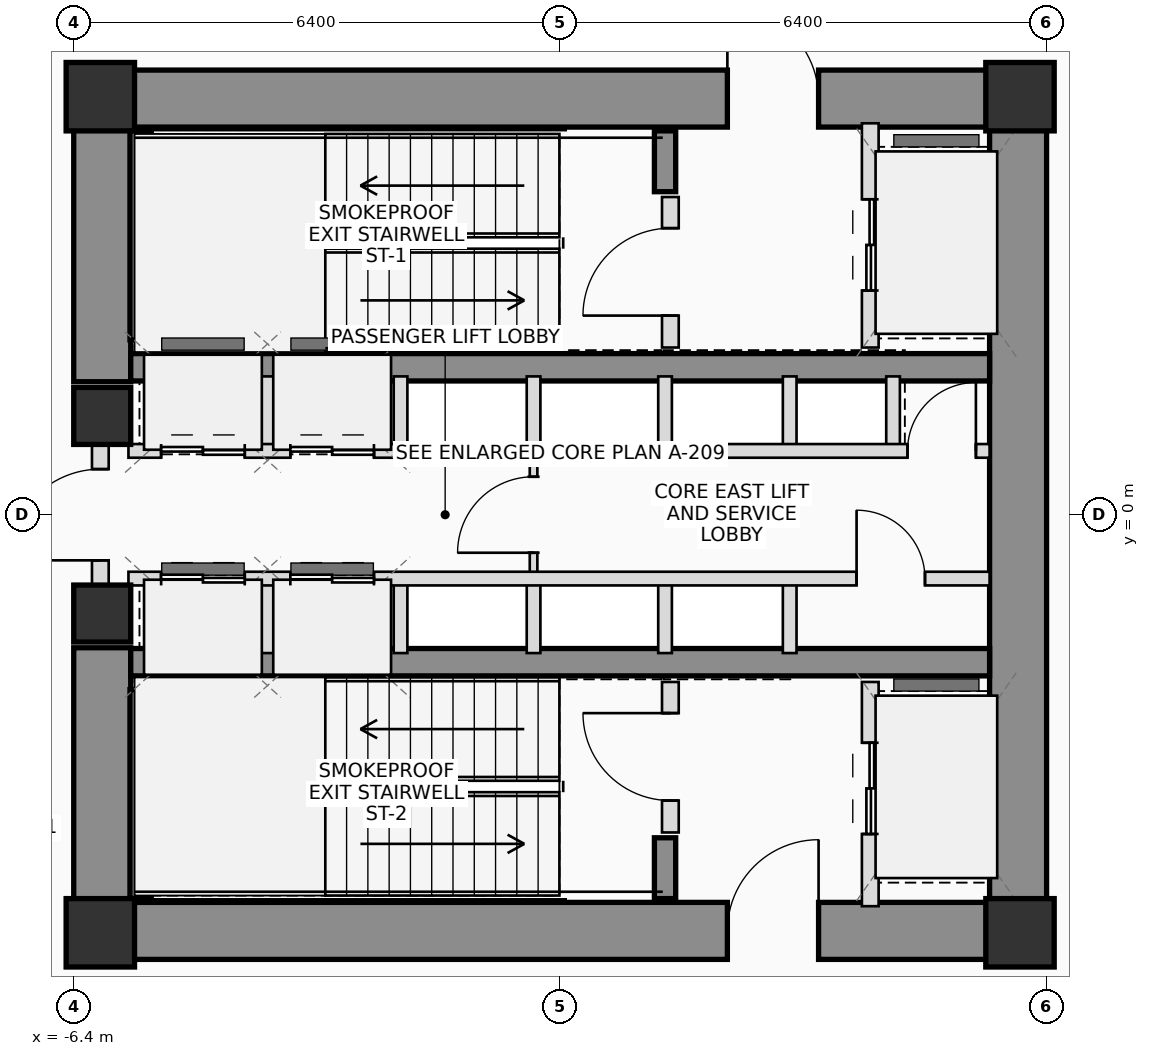
"""IFC4 building model, lengths in metres.
Left out: names, types, materials, properties, quantities, classifications, styles, units other than length and angle.
Written with IfcOpenShell. Run it as: python <this file> out.ifc"""

import sys

from ifc_helpers import new_model, si_unit, direction, frame, frame_2d, origin, origin_2d, place, context, subcontext, project, spatial, rectangle, extrude, source, transform, mapped, element, fill, save


model = new_model("IFC4")
c1 = context("Model", 3, precision=1e-05, world=origin(), true_north=direction((0.0, 1.0)))
c2 = subcontext(c1, "Body", "Model", "MODEL_VIEW")
j1 = project(units=[si_unit("LENGTHUNIT", "METRE"), si_unit("PLANEANGLEUNIT", "RADIAN")], contexts=[c1])
p1 = place(None, origin())
s1 = spatial("IfcSite", under=j1, at=p1, CompositionType="ELEMENT")
p2 = place(p1, origin())
s2 = spatial("IfcBuilding", under=s1, at=p2, CompositionType="ELEMENT")
p3 = place(p2, frame((0.0, 0.0, 108.65)))
s3 = spatial("IfcBuildingStorey", under=s2, at=p3, CompositionType="ELEMENT", Elevation=108.65)
m1 = source(origin(), c2, "Body", "SweptSolid", [
    extrude(rectangle(XDim=0.9, YDim=0.9, at=origin_2d()), origin(), (0.0, 0.0, 1.0), 3.75),
])
for number, where, z_axis, x_axis in (
    (1, (-6.05, -5.5, 0.0), (0.0, 0.0, 1.0), (1.0, 0.0, 0.0)),
    (2, (6.05, -5.5, 0.0), (0.0, 0.0, 1.0), (1.0, 0.0, 0.0)),
    (3, (6.05, 5.5, 0.0), (0.0, 0.0, 1.0), (1.0, 0.0, 0.0)),
    (4, (-6.05, 5.5, 0.0), (0.0, 0.0, 1.0), (1.0, 0.0, 0.0)),
):
    element("IfcColumn", number, at=place(p3, frame(where, z_axis=z_axis, x_axis=x_axis)), inside=s3, PredefinedType="COLUMN", context=c2, shape_type="MappedRepresentation", body=[
        mapped(m1, transform((0.0, 0.0, 0.0), scale=1.0)),
    ])
p4 = place(p3, frame((-6.4, 5.475, 0.0), z_axis=(0.0, 0.0, 1.0), x_axis=(1.0, 0.0, 0.0)))
e5 = element("IfcWall", 5, at=p4, inside=s3, PredefinedType="SHEAR", context=c2, shape_type="SweptSolid", body=[
    extrude(rectangle(XDim=12.8, YDim=0.75, at=frame_2d((6.4, 0.0))), origin(), (0.0, 0.0, 1.0), 3.75),
])
p5 = place(p4, frame((8.6, 0.0, 0.0)))
e6 = element("IfcOpeningElement", 6, at=p5, cuts=e5, PredefinedType="OPENING", context=c2, shape_type="SweptSolid", body=[
    extrude(rectangle(XDim=1.2, YDim=2.2, at=frame_2d((0.6, 1.1))), frame((0.0, 0.385, 0.0), z_axis=(0.0, -1.0, 0.0), x_axis=(1.0, 0.0, 0.0)), (0.0, 0.0, 1.0), 0.77),
])
p6 = place(p3, frame((-6.4, -5.475, 0.0), z_axis=(0.0, 0.0, 1.0), x_axis=(1.0, 0.0, 0.0)))
e7 = element("IfcWall", 7, at=p6, inside=s3, PredefinedType="SHEAR", context=c2, shape_type="SweptSolid", body=[
    extrude(rectangle(XDim=12.8, YDim=0.75, at=frame_2d((6.4, 0.0))), origin(), (0.0, 0.0, 1.0), 3.75),
])
p7 = place(p6, frame((8.6, 0.0, 0.0)))
e8 = element("IfcOpeningElement", 8, at=p7, cuts=e7, PredefinedType="OPENING", context=c2, shape_type="SweptSolid", body=[
    extrude(rectangle(XDim=1.2, YDim=2.2, at=frame_2d((0.6, 1.1))), frame((0.0, 0.385, 0.0), z_axis=(0.0, -1.0, 0.0), x_axis=(1.0, 0.0, 0.0)), (0.0, 0.0, 1.0), 0.77),
])
p8 = place(p3, frame((6.025, -5.1, 0.0), z_axis=(0.0, 0.0, 1.0), x_axis=(0.0, 1.0, 0.0)))
e9 = element("IfcWall", 9, at=p8, inside=s3, PredefinedType="SHEAR", context=c2, shape_type="SweptSolid", body=[
    extrude(rectangle(XDim=10.2, YDim=0.75, at=frame_2d((5.1, 0.0))), origin(), (0.0, 0.0, 1.0), 3.75),
])
for number, where, z_axis, x_axis in (
    (10, (-6.025, -5.1, 0.0), (0.0, 0.0, 1.0), (0.0, 1.0, 0.0)),
    (11, (-6.025, 1.75, 0.0), (0.0, 0.0, 1.0), (0.0, 1.0, 0.0)),
):
    element("IfcWall", number, at=place(p3, frame(where, z_axis=z_axis, x_axis=x_axis)), inside=s3, PredefinedType="SHEAR", context=c2, shape_type="SweptSolid", body=[
        extrude(rectangle(XDim=3.35, YDim=0.75, at=frame_2d((1.675, 0.0))), origin(), (0.0, 0.0, 1.0), 3.75),
    ])
for number, where, z_axis, x_axis in (
    (12, (-5.65, 1.94, 0.0), (0.0, 0.0, 1.0), (1.0, 0.0, 0.0)),
    (13, (-5.65, -1.94, 0.0), (0.0, 0.0, 1.0), (1.0, 0.0, 0.0)),
):
    element("IfcWall", number, at=place(p3, frame(where, z_axis=z_axis, x_axis=x_axis)), inside=s3, PredefinedType="SHEAR", context=c2, shape_type="SweptSolid", body=[
        extrude(rectangle(XDim=11.3, YDim=0.36, at=frame_2d((5.65, 0.0))), origin(), (0.0, 0.0, 1.0), 3.75),
    ])
p9 = place(p3, frame((-5.52, 2.3, 0.0), z_axis=(0.0, 0.0, 1.0), x_axis=(0.0, 1.0, 0.0)))
e14 = element("IfcWall", 14, at=p9, inside=s3, PredefinedType="SHEAR", context=c2, shape_type="SweptSolid", body=[
    extrude(rectangle(XDim=2.75, YDim=0.28, at=frame_2d((1.375, 0.0))), origin(), (0.0, 0.0, 1.0), 3.75),
])
p10 = place(p3, frame((1.38, 4.25, 0.0), z_axis=(0.0, 0.0, 1.0), x_axis=(0.0, 1.0, 0.0)))
e15 = element("IfcWall", 15, at=p10, inside=s3, PredefinedType="SHEAR", context=c2, shape_type="SweptSolid", body=[
    extrude(rectangle(XDim=0.8, YDim=0.28, at=frame_2d((0.4, 0.0))), origin(), (0.0, 0.0, 1.0), 3.75),
])
p11 = place(p3, frame((-5.52, -5.05, 0.0), z_axis=(0.0, 0.0, 1.0), x_axis=(0.0, 1.0, 0.0)))
e16 = element("IfcWall", 16, at=p11, inside=s3, PredefinedType="SHEAR", context=c2, shape_type="SweptSolid", body=[
    extrude(rectangle(XDim=2.75, YDim=0.28, at=frame_2d((1.375, 0.0))), origin(), (0.0, 0.0, 1.0), 3.75),
])
p12 = place(p3, frame((1.38, -5.05, 0.0), z_axis=(0.0, 0.0, 1.0), x_axis=(0.0, 1.0, 0.0)))
e17 = element("IfcWall", 17, at=p12, inside=s3, PredefinedType="SHEAR", context=c2, shape_type="SweptSolid", body=[
    extrude(rectangle(XDim=0.8, YDim=0.28, at=frame_2d((0.4, 0.0))), origin(), (0.0, 0.0, 1.0), 3.75),
])
m2 = source(origin(), c2, "Body", "SweptSolid", [
    extrude(rectangle(XDim=0.75, YDim=0.75, at=origin_2d()), origin(), (0.0, 0.0, 1.0), 3.75),
])
for number, where, z_axis, x_axis in (
    (18, (-6.025, -1.3, 0.0), (0.0, 0.0, 1.0), (1.0, 0.0, 0.0)),
    (19, (-6.025, 1.3, 0.0), (0.0, 0.0, 1.0), (1.0, 0.0, 0.0)),
):
    element("IfcColumn", number, at=place(p3, frame(where, z_axis=z_axis, x_axis=x_axis)), inside=s3, PredefinedType="COLUMN", context=c2, shape_type="MappedRepresentation", body=[
        mapped(m2, transform((0.0, 0.0, 0.0), scale=1.0)),
    ])
p13 = place(p3, frame((-6.05, -0.95, 0.0), z_axis=(0.0, 0.0, 1.0), x_axis=(0.0, 1.0, 0.0)))
e20 = element("IfcWall", 20, at=p13, inside=s3, PredefinedType="PLUMBINGWALL", context=c2, shape_type="SweptSolid", body=[
    extrude(rectangle(XDim=1.9, YDim=0.22, at=frame_2d((0.95, 0.0))), origin(), (0.0, 0.0, 1.0), 2.525),
])
p14 = place(p13, frame((0.35, 0.0, 0.0)))
e21 = element("IfcOpeningElement", 21, at=p14, cuts=e20, PredefinedType="OPENING", context=c2, shape_type="SweptSolid", body=[
    extrude(rectangle(XDim=1.2, YDim=2.2, at=frame_2d((0.6, 1.1))), frame((0.0, 0.12, 0.0), z_axis=(0.0, -1.0, 0.0), x_axis=(1.0, 0.0, 0.0)), (0.0, 0.0, 1.0), 0.24),
])
p15 = place(p3, frame((1.45, 2.2, 0.0), z_axis=(0.0, 0.0, 1.0), x_axis=(0.0, 1.0, 0.0)))
e22 = element("IfcWall", 22, at=p15, inside=s3, PredefinedType="PLUMBINGWALL", context=c2, shape_type="SweptSolid", body=[
    extrude(rectangle(XDim=1.98, YDim=0.22, at=frame_2d((0.99, 0.0))), origin(), (0.0, 0.0, 1.0), 3.545),
])
p16 = place(p15, frame((0.42, 0.0, 0.0)))
e23 = element("IfcOpeningElement", 23, at=p16, cuts=e22, PredefinedType="OPENING", context=c2, shape_type="SweptSolid", body=[
    extrude(rectangle(XDim=1.15, YDim=2.15, at=frame_2d((0.575, 1.075))), frame((0.0, 0.12, 0.0), z_axis=(0.0, -1.0, 0.0), x_axis=(1.0, 0.0, 0.0)), (0.0, 0.0, 1.0), 0.24),
])
p17 = place(p3, frame((4.08, 2.2, 0.0), z_axis=(0.0, 0.0, 1.0), x_axis=(0.0, 1.0, 0.0)))
e24 = element("IfcWall", 24, at=p17, inside=s3, PredefinedType="PLUMBINGWALL", context=c2, shape_type="SweptSolid", body=[
    extrude(rectangle(XDim=2.95, YDim=0.22, at=frame_2d((1.475, 0.0))), origin(), (0.0, 0.0, 1.0), 3.545),
])
p18 = place(p17, frame((0.75, 0.0, 0.0)))
e25 = element("IfcOpeningElement", 25, at=p18, cuts=e24, PredefinedType="OPENING", context=c2, shape_type="SweptSolid", body=[
    extrude(rectangle(XDim=1.2, YDim=2.25, at=frame_2d((0.6, 1.125))), frame((0.0, 0.12, 0.0), z_axis=(0.0, -1.0, 0.0), x_axis=(1.0, 0.0, 0.0)), (0.0, 0.0, 1.0), 0.24),
])
p19 = place(p3, frame((1.45, -4.18, 0.0), z_axis=(0.0, 0.0, 1.0), x_axis=(0.0, 1.0, 0.0)))
e26 = element("IfcWall", 26, at=p19, inside=s3, PredefinedType="PLUMBINGWALL", context=c2, shape_type="SweptSolid", body=[
    extrude(rectangle(XDim=1.98, YDim=0.22, at=frame_2d((0.99, 0.0))), origin(), (0.0, 0.0, 1.0), 3.545),
])
p20 = place(p19, frame((0.42, 0.0, 0.0)))
e27 = element("IfcOpeningElement", 27, at=p20, cuts=e26, PredefinedType="OPENING", context=c2, shape_type="SweptSolid", body=[
    extrude(rectangle(XDim=1.15, YDim=2.15, at=frame_2d((0.575, 1.075))), frame((0.0, 0.12, 0.0), z_axis=(0.0, -1.0, 0.0), x_axis=(1.0, 0.0, 0.0)), (0.0, 0.0, 1.0), 0.24),
])
p21 = place(p3, frame((4.08, -5.15, 0.0), z_axis=(0.0, 0.0, 1.0), x_axis=(0.0, 1.0, 0.0)))
e28 = element("IfcWall", 28, at=p21, inside=s3, PredefinedType="PLUMBINGWALL", context=c2, shape_type="SweptSolid", body=[
    extrude(rectangle(XDim=2.95, YDim=0.22, at=frame_2d((1.475, 0.0))), origin(), (0.0, 0.0, 1.0), 3.545),
])
p22 = place(p21, frame((0.95, 0.0, 0.0)))
e29 = element("IfcOpeningElement", 29, at=p22, cuts=e28, PredefinedType="OPENING", context=c2, shape_type="SweptSolid", body=[
    extrude(rectangle(XDim=1.2, YDim=2.25, at=frame_2d((0.6, 1.125))), frame((0.0, 0.12, 0.0), z_axis=(0.0, -1.0, 0.0), x_axis=(1.0, 0.0, 0.0)), (0.0, 0.0, 1.0), 0.24),
])
p23 = place(p3, frame((-0.35, -0.84, 0.0), z_axis=(0.0, 0.0, 1.0), x_axis=(0.0, 1.0, 0.0)))
e30 = element("IfcWall", 30, at=p23, inside=s3, PredefinedType="PARTITIONING", context=c2, shape_type="SweptSolid", body=[
    extrude(rectangle(XDim=1.68, YDim=0.1, at=frame_2d((0.84, 0.0))), origin(), (0.0, 0.0, 1.0), 3.545),
])
p24 = place(p23, frame((0.34, 0.0, 0.0)))
e31 = element("IfcOpeningElement", 31, at=p24, cuts=e30, PredefinedType="OPENING", context=c2, shape_type="SweptSolid", body=[
    extrude(rectangle(XDim=1.0, YDim=2.25, at=frame_2d((0.5, 1.125))), frame((0.0, 0.06, 0.0), z_axis=(0.0, -1.0, 0.0), x_axis=(1.0, 0.0, 0.0)), (0.0, 0.0, 1.0), 0.12),
])
for number, where, z_axis, x_axis in (
    (32, (-3.85, 0.84, 0.0), (0.0, 0.0, 1.0), (0.0, 1.0, 0.0)),
    (33, (-3.85, -1.82, 0.0), (0.0, 0.0, 1.0), (0.0, 1.0, 0.0)),
    (34, (-2.1, 0.84, 0.0), (0.0, 0.0, 1.0), (0.0, 1.0, 0.0)),
    (35, (-2.1, -1.82, 0.0), (0.0, 0.0, 1.0), (0.0, 1.0, 0.0)),
    (36, (-0.35, 0.84, 0.0), (0.0, 0.0, 1.0), (0.0, 1.0, 0.0)),
    (37, (-0.35, -1.82, 0.0), (0.0, 0.0, 1.0), (0.0, 1.0, 0.0)),
    (38, (1.38, 0.84, 0.0), (0.0, 0.0, 1.0), (0.0, 1.0, 0.0)),
    (39, (1.38, -1.82, 0.0), (0.0, 0.0, 1.0), (0.0, 1.0, 0.0)),
    (40, (3.02, 0.84, 0.0), (0.0, 0.0, 1.0), (0.0, 1.0, 0.0)),
    (41, (4.38, 0.84, 0.0), (0.0, 0.0, 1.0), (0.0, 1.0, 0.0)),
    (42, (3.02, -1.82, 0.0), (0.0, 0.0, 1.0), (0.0, 1.0, 0.0)),
):
    element("IfcWall", number, at=place(p3, frame(where, z_axis=z_axis, x_axis=x_axis)), inside=s3, PredefinedType="PLUMBINGWALL", context=c2, shape_type="SweptSolid", body=[
        extrude(rectangle(XDim=0.98, YDim=0.18, at=frame_2d((0.49, 0.0))), origin(), (0.0, 0.0, 1.0), 3.545),
    ])
p25 = place(p3, frame((-5.68, 0.84, 0.0), z_axis=(0.0, 0.0, 1.0), x_axis=(1.0, 0.0, 0.0)))
e43 = element("IfcWall", 43, at=p25, inside=s3, PredefinedType="PLUMBINGWALL", context=c2, shape_type="SweptSolid", body=[
    extrude(rectangle(XDim=11.33, YDim=0.18, at=frame_2d((5.665, 0.0))), origin(), (0.0, 0.0, 1.0), 3.545),
])
p26 = place(p25, frame((0.43, 0.0, 0.0)))
e44 = element("IfcOpeningElement", 44, at=p26, cuts=e43, PredefinedType="OPENING", context=c2, shape_type="SweptSolid", body=[
    extrude(rectangle(XDim=1.1, YDim=2.2, at=frame_2d((0.55, 1.1))), frame((0.0, 0.1, 0.0), z_axis=(0.0, -1.0, 0.0), x_axis=(1.0, 0.0, 0.0)), (0.0, 0.0, 1.0), 0.2),
])
p27 = place(p25, frame((2.13, 0.0, 0.0)))
e45 = element("IfcOpeningElement", 45, at=p27, cuts=e43, PredefinedType="OPENING", context=c2, shape_type="SweptSolid", body=[
    extrude(rectangle(XDim=1.1, YDim=2.2, at=frame_2d((0.55, 1.1))), frame((0.0, 0.1, 0.0), z_axis=(0.0, -1.0, 0.0), x_axis=(1.0, 0.0, 0.0)), (0.0, 0.0, 1.0), 0.2),
])
p28 = place(p25, frame((10.25, 0.0, 0.0)))
e46 = element("IfcOpeningElement", 46, at=p28, cuts=e43, PredefinedType="OPENING", context=c2, shape_type="SweptSolid", body=[
    extrude(rectangle(XDim=0.9, YDim=2.05, at=frame_2d((0.45, 1.025))), frame((0.0, 0.1, 0.0), z_axis=(0.0, -1.0, 0.0), x_axis=(1.0, 0.0, 0.0)), (0.0, 0.0, 1.0), 0.2),
])
p29 = place(p3, frame((-5.68, -0.84, 0.0), z_axis=(0.0, 0.0, 1.0), x_axis=(1.0, 0.0, 0.0)))
e47 = element("IfcWall", 47, at=p29, inside=s3, PredefinedType="PLUMBINGWALL", context=c2, shape_type="SweptSolid", body=[
    extrude(rectangle(XDim=11.33, YDim=0.18, at=frame_2d((5.665, 0.0))), origin(), (0.0, 0.0, 1.0), 3.545),
])
p30 = place(p29, frame((0.43, 0.0, 0.0)))
e48 = element("IfcOpeningElement", 48, at=p30, cuts=e47, PredefinedType="OPENING", context=c2, shape_type="SweptSolid", body=[
    extrude(rectangle(XDim=1.1, YDim=2.2, at=frame_2d((0.55, 1.1))), frame((0.0, 0.1, 0.0), z_axis=(0.0, -1.0, 0.0), x_axis=(1.0, 0.0, 0.0)), (0.0, 0.0, 1.0), 0.2),
])
p31 = place(p29, frame((2.13, 0.0, 0.0)))
e49 = element("IfcOpeningElement", 49, at=p31, cuts=e47, PredefinedType="OPENING", context=c2, shape_type="SweptSolid", body=[
    extrude(rectangle(XDim=1.1, YDim=2.2, at=frame_2d((0.55, 1.1))), frame((0.0, 0.1, 0.0), z_axis=(0.0, -1.0, 0.0), x_axis=(1.0, 0.0, 0.0)), (0.0, 0.0, 1.0), 0.2),
])
p32 = place(p29, frame((9.58, 0.0, 0.0)))
e50 = element("IfcOpeningElement", 50, at=p32, cuts=e47, PredefinedType="OPENING", context=c2, shape_type="SweptSolid", body=[
    extrude(rectangle(XDim=0.9, YDim=2.05, at=frame_2d((0.45, 1.025))), frame((0.0, 0.1, 0.0), z_axis=(0.0, -1.0, 0.0), x_axis=(1.0, 0.0, 0.0)), (0.0, 0.0, 1.0), 0.2),
])
p33 = place(p5, origin())
e51 = element("IfcDoor", 51, at=p33, inside=s3, OperationType="SINGLE_SWING_LEFT", PredefinedType="DOOR", context=c2, shape_type="SweptSolid", body=[
    extrude(rectangle(XDim=1.2, YDim=2.2, at=frame_2d((0.6, 1.1))), frame((0.0, 0.025, 0.0), z_axis=(0.0, -1.0, 0.0), x_axis=(1.0, 0.0, 0.0)), (0.0, 0.0, 1.0), 0.05),
])
fill(e6, e51)
p34 = place(p7, origin())
e52 = element("IfcDoor", 52, at=p34, inside=s3, OperationType="SINGLE_SWING_RIGHT", PredefinedType="DOOR", context=c2, shape_type="SweptSolid", body=[
    extrude(rectangle(XDim=1.2, YDim=2.2, at=frame_2d((0.6, 1.1))), frame((0.0, 0.025, 0.0), z_axis=(0.0, -1.0, 0.0), x_axis=(1.0, 0.0, 0.0)), (0.0, 0.0, 1.0), 0.05),
])
fill(e8, e52)
p35 = place(p14, origin())
e53 = element("IfcDoor", 53, at=p35, inside=s3, OperationType="SINGLE_SWING_LEFT", PredefinedType="DOOR", context=c2, shape_type="SweptSolid", body=[
    extrude(rectangle(XDim=1.2, YDim=2.2, at=frame_2d((0.6, 1.1))), frame((0.0, 0.025, 0.0), z_axis=(0.0, -1.0, 0.0), x_axis=(1.0, 0.0, 0.0)), (0.0, 0.0, 1.0), 0.05),
])
fill(e21, e53)
p36 = place(p16, origin())
e54 = element("IfcDoor", 54, at=p36, inside=s3, OperationType="SINGLE_SWING_LEFT", PredefinedType="DOOR", context=c2, shape_type="SweptSolid", body=[
    extrude(rectangle(XDim=1.15, YDim=2.15, at=frame_2d((0.575, 1.075))), frame((0.0, 0.025, 0.0), z_axis=(0.0, -1.0, 0.0), x_axis=(1.0, 0.0, 0.0)), (0.0, 0.0, 1.0), 0.05),
])
fill(e23, e54)
p37 = place(p18, origin())
e55 = element("IfcDoor", 55, at=p37, inside=s3, OperationType="DOUBLE_DOOR_SLIDING", PredefinedType="DOOR", context=c2, shape_type="SweptSolid", body=[
    extrude(rectangle(XDim=1.2, YDim=2.25, at=frame_2d((0.6, 1.125))), frame((0.0, 0.025, 0.0), z_axis=(0.0, -1.0, 0.0), x_axis=(1.0, 0.0, 0.0)), (0.0, 0.0, 1.0), 0.05),
])
fill(e25, e55)
p38 = place(p20, origin())
e56 = element("IfcDoor", 56, at=p38, inside=s3, OperationType="SINGLE_SWING_RIGHT", PredefinedType="DOOR", context=c2, shape_type="SweptSolid", body=[
    extrude(rectangle(XDim=1.15, YDim=2.15, at=frame_2d((0.575, 1.075))), frame((0.0, 0.025, 0.0), z_axis=(0.0, -1.0, 0.0), x_axis=(1.0, 0.0, 0.0)), (0.0, 0.0, 1.0), 0.05),
])
fill(e27, e56)
p39 = place(p22, origin())
e57 = element("IfcDoor", 57, at=p39, inside=s3, OperationType="DOUBLE_DOOR_SLIDING", PredefinedType="DOOR", context=c2, shape_type="SweptSolid", body=[
    extrude(rectangle(XDim=1.2, YDim=2.25, at=frame_2d((0.6, 1.125))), frame((0.0, 0.025, 0.0), z_axis=(0.0, -1.0, 0.0), x_axis=(1.0, 0.0, 0.0)), (0.0, 0.0, 1.0), 0.05),
])
fill(e29, e57)
p40 = place(p24, origin())
e58 = element("IfcDoor", 58, at=p40, inside=s3, OperationType="SINGLE_SWING_LEFT", PredefinedType="DOOR", context=c2, shape_type="SweptSolid", body=[
    extrude(rectangle(XDim=1.0, YDim=2.25, at=frame_2d((0.5, 1.125))), frame((0.0, 0.025, 0.0), z_axis=(0.0, -1.0, 0.0), x_axis=(1.0, 0.0, 0.0)), (0.0, 0.0, 1.0), 0.05),
])
fill(e31, e58)
p41 = place(p26, origin())
e59 = element("IfcDoor", 59, at=p41, inside=s3, OperationType="DOUBLE_DOOR_SLIDING", PredefinedType="DOOR", context=c2, shape_type="SweptSolid", body=[
    extrude(rectangle(XDim=1.1, YDim=2.2, at=frame_2d((0.55, 1.1))), frame((0.0, 0.025, 0.0), z_axis=(0.0, -1.0, 0.0), x_axis=(1.0, 0.0, 0.0)), (0.0, 0.0, 1.0), 0.05),
])
fill(e44, e59)
p42 = place(p27, origin())
e60 = element("IfcDoor", 60, at=p42, inside=s3, OperationType="DOUBLE_DOOR_SLIDING", PredefinedType="DOOR", context=c2, shape_type="SweptSolid", body=[
    extrude(rectangle(XDim=1.1, YDim=2.2, at=frame_2d((0.55, 1.1))), frame((0.0, 0.025, 0.0), z_axis=(0.0, -1.0, 0.0), x_axis=(1.0, 0.0, 0.0)), (0.0, 0.0, 1.0), 0.05),
])
fill(e45, e60)
p43 = place(p28, origin())
e61 = element("IfcDoor", 61, at=p43, inside=s3, OperationType="SINGLE_SWING_RIGHT", PredefinedType="DOOR", context=c2, shape_type="SweptSolid", body=[
    extrude(rectangle(XDim=0.9, YDim=2.05, at=frame_2d((0.45, 1.025))), frame((0.0, 0.025, 0.0), z_axis=(0.0, -1.0, 0.0), x_axis=(1.0, 0.0, 0.0)), (0.0, 0.0, 1.0), 0.05),
])
fill(e46, e61)
p44 = place(p30, origin())
e62 = element("IfcDoor", 62, at=p44, inside=s3, OperationType="DOUBLE_DOOR_SLIDING", PredefinedType="DOOR", context=c2, shape_type="SweptSolid", body=[
    extrude(rectangle(XDim=1.1, YDim=2.2, at=frame_2d((0.55, 1.1))), frame((0.0, 0.025, 0.0), z_axis=(0.0, -1.0, 0.0), x_axis=(1.0, 0.0, 0.0)), (0.0, 0.0, 1.0), 0.05),
])
fill(e48, e62)
p45 = place(p31, origin())
e63 = element("IfcDoor", 63, at=p45, inside=s3, OperationType="DOUBLE_DOOR_SLIDING", PredefinedType="DOOR", context=c2, shape_type="SweptSolid", body=[
    extrude(rectangle(XDim=1.1, YDim=2.2, at=frame_2d((0.55, 1.1))), frame((0.0, 0.025, 0.0), z_axis=(0.0, -1.0, 0.0), x_axis=(1.0, 0.0, 0.0)), (0.0, 0.0, 1.0), 0.05),
])
fill(e49, e63)
p46 = place(p32, origin())
e64 = element("IfcDoor", 64, at=p46, inside=s3, OperationType="SINGLE_SWING_LEFT", PredefinedType="DOOR", context=c2, shape_type="SweptSolid", body=[
    extrude(rectangle(XDim=0.9, YDim=2.05, at=frame_2d((0.45, 1.025))), frame((0.0, 0.025, 0.0), z_axis=(0.0, -1.0, 0.0), x_axis=(1.0, 0.0, 0.0)), (0.0, 0.0, 1.0), 0.05),
])
fill(e50, e64)
save(model, sys.argv[1])
